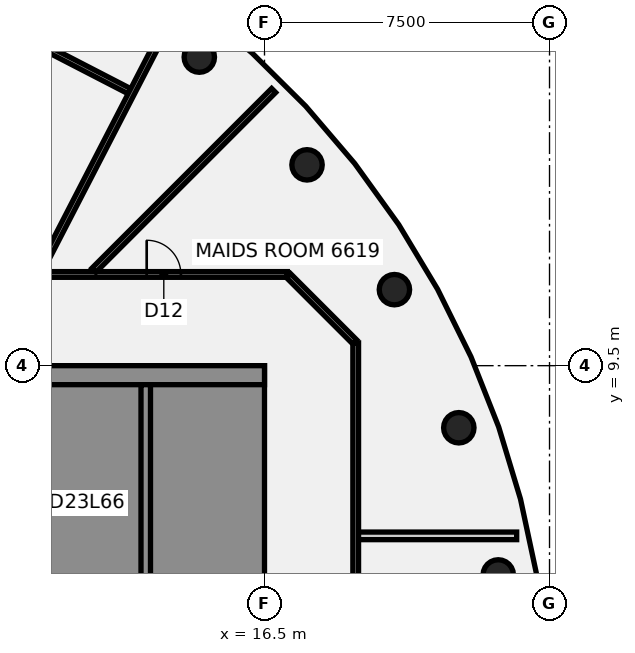
"""IFC4 building model, lengths in metres.
Left out: names, types, materials, properties, quantities, classifications, styles, units other than length and angle.
Written with IfcOpenShell. Run it as: python <this file> out.ifc"""

import sys

from ifc_helpers import new_model, si_unit, direction, frame, frame_2d, origin, origin_2d, place, context, subcontext, project, spatial, polyline, rectangle, circle, outline, extrude, element, fill, save


model = new_model("IFC4")
c1 = context("Model", 3, precision=1e-05, world=origin(), true_north=direction((0.0, 1.0)))
c2 = subcontext(c1, "Body", "Model", "MODEL_VIEW")
j1 = project(units=[si_unit("LENGTHUNIT", "METRE"), si_unit("PLANEANGLEUNIT", "RADIAN")], contexts=[c1])
p1 = place(None, origin())
s1 = spatial("IfcSite", under=j1, at=p1, CompositionType="ELEMENT")
p2 = place(p1, origin())
s2 = spatial("IfcBuilding", under=s1, at=p2, CompositionType="ELEMENT")
p3 = place(p2, frame((0.0, 0.0, 260.4)))
s3 = spatial("IfcBuildingStorey", under=s2, at=p3, CompositionType="ELEMENT", Elevation=260.4)
for number, where, z_axis, x_axis in (
    (1, (22.651, 3.994, -0.14), (0.0, 0.0, 1.0), (1.0, 0.0, 0.0)),
    (2, (21.613, 7.866, -0.14), (0.0, 0.0, 1.0), (1.0, 0.0, 0.0)),
    (3, (19.919, 11.5, -0.14), (0.0, 0.0, 1.0), (1.0, 0.0, 0.0)),
    (4, (17.619, 14.784, -0.14), (0.0, 0.0, 1.0), (1.0, 0.0, 0.0)),
    (5, (14.784, 17.619, -0.14), (0.0, 0.0, 1.0), (1.0, 0.0, 0.0)),
):
    element("IfcColumn", number, at=place(p3, frame(where, z_axis=z_axis, x_axis=x_axis)), inside=s3, PredefinedType="COLUMN", context=c2, shape_type="SweptSolid", body=[
        extrude(circle(Radius=0.4, at=origin_2d()), origin(), (0.0, 0.0, 1.0), 3.6),
    ])
p4 = place(p3, frame((17.128, 11.872, 0.0), z_axis=(0.0, 0.0, 1.0), x_axis=(0.707106781187, -0.707106781187, 0.0)))
e6 = element("IfcWall", 6, at=p4, inside=s3, PredefinedType="PARTITIONING", context=c2, shape_type="SweptSolid", body=[
    extrude(rectangle(XDim=2.465, YDim=0.15, at=frame_2d((1.232, 0.0))), origin(), (0.0, 0.0, 1.0), 2.864),
])
p5 = place(p3, frame((0.317, 23.243, 0.0), z_axis=(0.0, 0.0, 1.0), x_axis=(0.888531890229, -0.458814864675, 0.0)))
e7 = element("IfcWall", 7, at=p5, inside=s3, PredefinedType="PARTITIONING", context=c2, shape_type="SweptSolid", body=[
    extrude(rectangle(XDim=14.213, YDim=0.15, at=frame_2d((7.106, 0.0))), origin(), (0.0, 0.0, 1.0), 2.864),
])
p6 = place(p5, frame((4.35, 0.0, 0.0)))
e8 = element("IfcOpeningElement", 8, at=p6, cuts=e7, PredefinedType="OPENING", context=c2, shape_type="SweptSolid", body=[
    extrude(rectangle(XDim=1.8, YDim=2.1, at=frame_2d((0.9, 1.05))), frame((0.0, 0.085, 0.0), z_axis=(0.0, -1.0, 0.0), x_axis=(1.0, 0.0, 0.0)), (0.0, 0.0, 1.0), 0.17),
])
p7 = place(p3, frame((-17.065, 11.9, 0.0), z_axis=(0.0, 0.0, 1.0), x_axis=(1.0, 0.0, 0.0)))
e9 = element("IfcWall", 9, at=p7, inside=s3, PredefinedType="PARTITIONING", context=c2, shape_type="SweptSolid", body=[
    extrude(rectangle(XDim=34.165, YDim=0.15, at=frame_2d((17.083, 0.0))), origin(), (0.0, 0.0, 1.0), 2.864),
])
p8 = place(p7, frame((22.91, 0.0, 0.0)))
e10 = element("IfcOpeningElement", 10, at=p8, cuts=e9, PredefinedType="OPENING", context=c2, shape_type="SweptSolid", body=[
    extrude(rectangle(XDim=1.8, YDim=2.1, at=frame_2d((0.9, 1.05))), frame((0.0, 0.085, 0.0), z_axis=(0.0, -1.0, 0.0), x_axis=(1.0, 0.0, 0.0)), (0.0, 0.0, 1.0), 0.17),
])
p9 = place(p7, frame((30.465, 0.0, 0.0)))
e11 = element("IfcOpeningElement", 11, at=p9, cuts=e9, PredefinedType="OPENING", context=c2, shape_type="SweptSolid", body=[
    extrude(rectangle(XDim=0.9, YDim=2.1, at=frame_2d((0.45, 1.05))), frame((0.0, 0.085, 0.0), z_axis=(0.0, -1.0, 0.0), x_axis=(1.0, 0.0, 0.0)), (0.0, 0.0, 1.0), 0.17),
])
p10 = place(p7, frame((2.815, 0.0, 0.0)))
e12 = element("IfcOpeningElement", 12, at=p10, cuts=e9, PredefinedType="OPENING", context=c2, shape_type="SweptSolid", body=[
    extrude(rectangle(XDim=0.9, YDim=2.1, at=frame_2d((0.45, 1.05))), frame((0.0, 0.085, 0.0), z_axis=(0.0, -1.0, 0.0), x_axis=(1.0, 0.0, 0.0)), (0.0, 0.0, 1.0), 0.17),
])
p11 = place(p7, frame((11.765, 0.0, 0.0)))
e13 = element("IfcOpeningElement", 13, at=p11, cuts=e9, PredefinedType="OPENING", context=c2, shape_type="SweptSolid", body=[
    extrude(rectangle(XDim=1.8, YDim=2.1, at=frame_2d((0.9, 1.05))), frame((0.0, 0.085, 0.0), z_axis=(0.0, -1.0, 0.0), x_axis=(1.0, 0.0, 0.0)), (0.0, 0.0, 1.0), 0.17),
])
p12 = place(p3, frame((18.955, 5.022, 0.0), z_axis=(0.0, 0.0, 1.0), x_axis=(1.0, 0.0, 0.0)))
e14 = element("IfcWall", 14, at=p12, inside=s3, PredefinedType="PARTITIONING", context=c2, shape_type="SweptSolid", body=[
    extrude(rectangle(XDim=4.181, YDim=0.2, at=frame_2d((2.09, 0.0))), origin(), (0.0, 0.0, 1.0), 2.864),
])
p13 = place(p3, frame((12.01, 12.01, 0.0), z_axis=(0.0, 0.0, 1.0), x_axis=(0.707106781187, 0.707106781187, 0.0)))
e15 = element("IfcWall", 15, at=p13, inside=s3, PredefinedType="PARTITIONING", context=c2, shape_type="SweptSolid", body=[
    extrude(rectangle(XDim=6.691, YDim=0.15, at=frame_2d((3.345, 0.0))), origin(), (0.0, 0.0, 1.0), 2.864),
])
p14 = place(p3, frame((10.589, 11.993, 0.0), z_axis=(0.0, 0.0, 1.0), x_axis=(0.458841921055, 0.888517918493, 0.0)))
e16 = element("IfcWall", 16, at=p14, inside=s3, PredefinedType="PARTITIONING", context=c2, shape_type="SweptSolid", body=[
    extrude(rectangle(XDim=7.844, YDim=0.15, at=frame_2d((3.922, 0.0))), origin(), (0.0, 0.0, 1.0), 2.864),
])
p15 = place(p3, frame((18.9, -10.1, 0.0), z_axis=(0.0, 0.0, 1.0), x_axis=(0.0, 1.0, 0.0)))
e17 = element("IfcWall", 17, at=p15, inside=s3, PredefinedType="PARTITIONING", context=c2, shape_type="SweptSolid", body=[
    extrude(rectangle(XDim=20.2, YDim=0.15, at=frame_2d((10.1, 0.0))), origin(), (0.0, 0.0, 1.0), 2.864),
])
p16 = place(p15, frame((10.454, 0.0, 0.0)))
e18 = element("IfcOpeningElement", 18, at=p16, cuts=e17, PredefinedType="OPENING", context=c2, shape_type="SweptSolid", body=[
    extrude(rectangle(XDim=0.9, YDim=2.1, at=frame_2d((0.45, 1.05))), frame((0.0, 0.085, 0.0), z_axis=(0.0, -1.0, 0.0), x_axis=(1.0, 0.0, 0.0)), (0.0, 0.0, 1.0), 0.17),
])
p17 = place(p3, origin())
e19 = element("IfcWall", 19, at=p17, inside=s3, PredefinedType="SHEAR", context=c2, shape_type="SweptSolid", body=[
    extrude(outline(polyline([(13.5, -8.125), (13.5, -9.0), (16.0, -9.0), (16.5, -9.0), (16.5, 9.0), (16.0, 9.0), (13.5, 9.0), (13.5, 8.125), (16.0, 8.125), (16.0, 5.625), (13.5, 5.625), (13.5, 5.375), (16.0, 5.375), (16.0, -5.375), (13.5, -5.375), (13.5, -5.625), (16.0, -5.625), (16.0, -8.125), (13.5, -8.125)])), origin(), (0.0, 0.0, 1.0), 3.46),
])
p18 = place(p3, frame((16.5, 9.25, 0.0), z_axis=(0.0, 0.0, 1.0), x_axis=(-1.0, 0.0, 0.0)))
e20 = element("IfcWall", 20, at=p18, inside=s3, PredefinedType="SHEAR", context=c2, shape_type="SweptSolid", body=[
    extrude(rectangle(XDim=13.0, YDim=0.5, at=frame_2d((6.5, 0.0))), origin(), (0.0, 0.0, 1.0), 3.46),
])
p19 = place(p3, frame((13.375, -9.0, 0.0), z_axis=(0.0, 0.0, 1.0), x_axis=(0.0, 1.0, 0.0)))
e21 = element("IfcWall", 21, at=p19, inside=s3, PredefinedType="SHEAR", context=c2, shape_type="SweptSolid", body=[
    extrude(rectangle(XDim=18.0, YDim=0.25, at=frame_2d((9.0, 0.0))), origin(), (0.0, 0.0, 1.0), 3.46),
])
p20 = place(p19, frame((1.425, 0.0, 0.0)))
e22 = element("IfcOpeningElement", 22, at=p20, cuts=e21, PredefinedType="OPENING", context=c2, shape_type="SweptSolid", body=[
    extrude(rectangle(XDim=1.4, YDim=2.1, at=frame_2d((0.7, 1.05))), frame((0.0, 0.135, 0.0), z_axis=(0.0, -1.0, 0.0), x_axis=(1.0, 0.0, 0.0)), (0.0, 0.0, 1.0), 0.27),
])
p21 = place(p19, frame((4.854, 0.0, 0.0)))
e23 = element("IfcOpeningElement", 23, at=p21, cuts=e21, PredefinedType="OPENING", context=c2, shape_type="SweptSolid", body=[
    extrude(rectangle(XDim=1.0, YDim=2.1, at=frame_2d((0.5, 1.05))), frame((0.0, 0.135, 0.0), z_axis=(0.0, -1.0, 0.0), x_axis=(1.0, 0.0, 0.0)), (0.0, 0.0, 1.0), 0.27),
])
p22 = place(p19, frame((10.354, 0.0, 0.0)))
e24 = element("IfcOpeningElement", 24, at=p22, cuts=e21, PredefinedType="OPENING", context=c2, shape_type="SweptSolid", body=[
    extrude(rectangle(XDim=1.0, YDim=2.1, at=frame_2d((0.5, 1.05))), frame((0.0, 0.135, 0.0), z_axis=(0.0, -1.0, 0.0), x_axis=(1.0, 0.0, 0.0)), (0.0, 0.0, 1.0), 0.27),
])
p23 = place(p9, origin())
e25 = element("IfcDoor", 25, at=p23, inside=s3, OperationType="SINGLE_SWING_LEFT", PredefinedType="DOOR", context=c2, shape_type="SweptSolid", body=[
    extrude(rectangle(XDim=0.9, YDim=2.1, at=frame_2d((0.45, 1.05))), frame((0.0, 0.025, 0.0), z_axis=(0.0, -1.0, 0.0), x_axis=(1.0, 0.0, 0.0)), (0.0, 0.0, 1.0), 0.05),
])
fill(e11, e25)
save(model, sys.argv[1])
